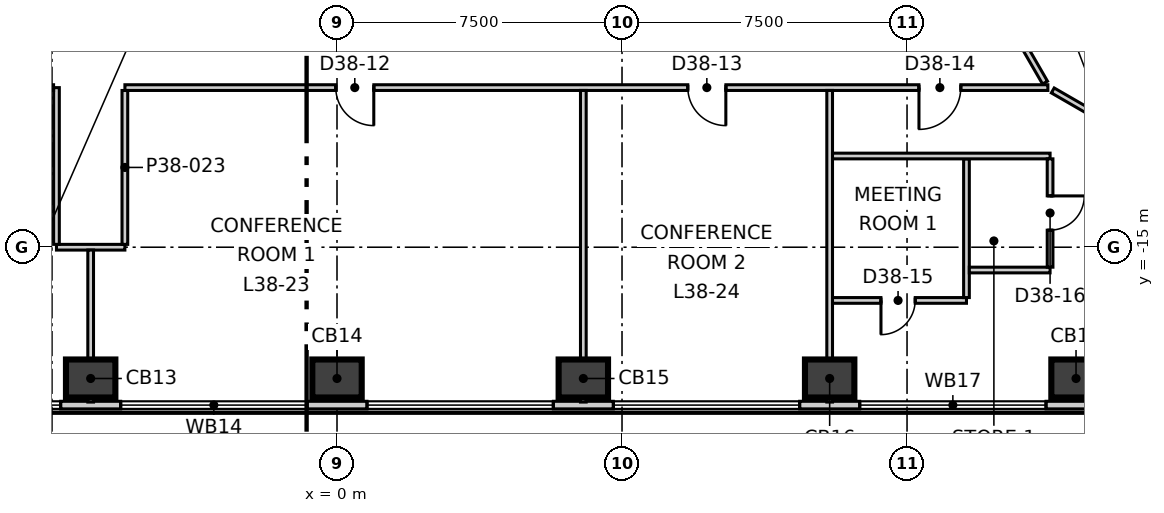
"""IFC4 building model, lengths in metres.
Left out: names, types, materials, properties, quantities, classifications, styles, units other than length and angle.
Written with IfcOpenShell. Run it as: python <this file> out.ifc"""

import sys

from ifc_helpers import new_model, si_unit, direction, frame, frame_2d, origin, origin_2d, place, context, subcontext, project, spatial, rectangle, extrude, element, fill, save


model = new_model("IFC4")
c1 = context("Model", 3, precision=1e-05, world=origin(), true_north=direction((0.0, 1.0)))
c2 = subcontext(c1, "Body", "Model", "MODEL_VIEW")
j1 = project(units=[si_unit("LENGTHUNIT", "METRE"), si_unit("PLANEANGLEUNIT", "RADIAN")], contexts=[c1])
p1 = place(None, origin())
s1 = spatial("IfcSite", under=j1, at=p1, CompositionType="ELEMENT")
p2 = place(p1, origin())
s2 = spatial("IfcBuilding", under=s1, at=p2, CompositionType="ELEMENT")
p3 = place(p2, frame((0.0, 0.0, 164.3)))
s3 = spatial("IfcBuildingStorey", under=s2, at=p3, CompositionType="ELEMENT", Elevation=164.3)
for number, where, z_axis, x_axis in (
    (1, (-6.482, -18.454, -0.3), (0.0, 0.0, 1.0), (1.0, 0.0, 0.0)),
    (2, (0.0, -18.454, -0.3), (0.0, 0.0, 1.0), (1.0, 0.0, 0.0)),
    (3, (6.482, -18.454, -0.3), (0.0, 0.0, 1.0), (1.0, 0.0, 0.0)),
    (4, (12.964, -18.454, -0.3), (0.0, 0.0, 1.0), (1.0, 0.0, 0.0)),
    (5, (19.447, -18.454, -0.3), (0.0, 0.0, 1.0), (1.0, 0.0, 0.0)),
):
    element("IfcColumn", number, at=place(p3, frame(where, z_axis=z_axis, x_axis=x_axis)), inside=s3, PredefinedType="COLUMN", context=c2, shape_type="SweptSolid", body=[
        extrude(rectangle(XDim=1.3, YDim=1.0, at=origin_2d()), origin(), (0.0, 0.0, 1.0), 4.0),
    ])
p4 = place(p3, frame((-2.972, 33.16, 0.0), z_axis=(0.0, 0.0, 1.0), x_axis=(-0.500009959561, -0.866019653553, 0.0)))
e6 = element("IfcWall", 6, at=p4, inside=s3, PredefinedType="ELEMENTEDWALL", context=c2, shape_type="SweptSolid", body=[
    extrude(rectangle(XDim=54.443, YDim=0.2, at=frame_2d((27.222, 0.0))), origin(), (0.0, 0.0, 1.0), 3.7),
])
p5 = place(p4, frame((2.094, 0.0, 0.9)))
e7 = element("IfcOpeningElement", 7, at=p5, cuts=e6, PredefinedType="OPENING", context=c2, shape_type="SweptSolid", body=[
    extrude(rectangle(XDim=4.9, YDim=2.5, at=frame_2d((2.45, 1.25))), frame((0.0, 0.11, 0.0), z_axis=(0.0, -1.0, 0.0), x_axis=(1.0, 0.0, 0.0)), (0.0, 0.0, 1.0), 0.22),
])
p6 = place(p4, frame((8.576, 0.0, 0.9)))
e8 = element("IfcOpeningElement", 8, at=p6, cuts=e6, PredefinedType="OPENING", context=c2, shape_type="SweptSolid", body=[
    extrude(rectangle(XDim=4.9, YDim=2.5, at=frame_2d((2.45, 1.25))), frame((0.0, 0.11, 0.0), z_axis=(0.0, -1.0, 0.0), x_axis=(1.0, 0.0, 0.0)), (0.0, 0.0, 1.0), 0.22),
])
p7 = place(p4, frame((15.058, 0.0, 0.9)))
e9 = element("IfcOpeningElement", 9, at=p7, cuts=e6, PredefinedType="OPENING", context=c2, shape_type="SweptSolid", body=[
    extrude(rectangle(XDim=4.9, YDim=2.5, at=frame_2d((2.45, 1.25))), frame((0.0, 0.11, 0.0), z_axis=(0.0, -1.0, 0.0), x_axis=(1.0, 0.0, 0.0)), (0.0, 0.0, 1.0), 0.22),
])
p8 = place(p4, frame((21.54, 0.0, 0.9)))
e10 = element("IfcOpeningElement", 10, at=p8, cuts=e6, PredefinedType="OPENING", context=c2, shape_type="SweptSolid", body=[
    extrude(rectangle(XDim=4.9, YDim=2.5, at=frame_2d((2.45, 1.25))), frame((0.0, 0.11, 0.0), z_axis=(0.0, -1.0, 0.0), x_axis=(1.0, 0.0, 0.0)), (0.0, 0.0, 1.0), 0.22),
])
p9 = place(p4, frame((28.022, 0.0, 0.9)))
e11 = element("IfcOpeningElement", 11, at=p9, cuts=e6, PredefinedType="OPENING", context=c2, shape_type="SweptSolid", body=[
    extrude(rectangle(XDim=4.9, YDim=2.5, at=frame_2d((2.45, 1.25))), frame((0.0, 0.11, 0.0), z_axis=(0.0, -1.0, 0.0), x_axis=(1.0, 0.0, 0.0)), (0.0, 0.0, 1.0), 0.22),
])
p10 = place(p4, frame((34.505, 0.0, 0.9)))
e12 = element("IfcOpeningElement", 12, at=p10, cuts=e6, PredefinedType="OPENING", context=c2, shape_type="SweptSolid", body=[
    extrude(rectangle(XDim=4.9, YDim=2.5, at=frame_2d((2.45, 1.25))), frame((0.0, 0.11, 0.0), z_axis=(0.0, -1.0, 0.0), x_axis=(1.0, 0.0, 0.0)), (0.0, 0.0, 1.0), 0.22),
])
p11 = place(p4, frame((40.987, 0.0, 0.9)))
e13 = element("IfcOpeningElement", 13, at=p11, cuts=e6, PredefinedType="OPENING", context=c2, shape_type="SweptSolid", body=[
    extrude(rectangle(XDim=4.9, YDim=2.5, at=frame_2d((2.45, 1.25))), frame((0.0, 0.11, 0.0), z_axis=(0.0, -1.0, 0.0), x_axis=(1.0, 0.0, 0.0)), (0.0, 0.0, 1.0), 0.22),
])
p12 = place(p4, frame((47.469, 0.0, 0.9)))
e14 = element("IfcOpeningElement", 14, at=p12, cuts=e6, PredefinedType="OPENING", context=c2, shape_type="SweptSolid", body=[
    extrude(rectangle(XDim=4.9, YDim=2.5, at=frame_2d((2.45, 1.25))), frame((0.0, 0.11, 0.0), z_axis=(0.0, -1.0, 0.0), x_axis=(1.0, 0.0, 0.0)), (0.0, 0.0, 1.0), 0.22),
])
p13 = place(p3, frame((-27.232, -19.154, 0.0), z_axis=(0.0, 0.0, 1.0), x_axis=(1.0, 0.0, 0.0)))
e15 = element("IfcWall", 15, at=p13, inside=s3, PredefinedType="ELEMENTEDWALL", context=c2, shape_type="SweptSolid", body=[
    extrude(rectangle(XDim=54.444, YDim=0.2, at=frame_2d((27.222, 0.0))), origin(), (0.0, 0.0, 1.0), 3.7),
])
p14 = place(p13, frame((2.094, 0.0, 0.9)))
e16 = element("IfcOpeningElement", 16, at=p14, cuts=e15, PredefinedType="OPENING", context=c2, shape_type="SweptSolid", body=[
    extrude(rectangle(XDim=4.9, YDim=2.5, at=frame_2d((2.45, 1.25))), frame((0.0, 0.11, 0.0), z_axis=(0.0, -1.0, 0.0), x_axis=(1.0, 0.0, 0.0)), (0.0, 0.0, 1.0), 0.22),
])
p15 = place(p13, frame((8.576, 0.0, 0.9)))
e17 = element("IfcOpeningElement", 17, at=p15, cuts=e15, PredefinedType="OPENING", context=c2, shape_type="SweptSolid", body=[
    extrude(rectangle(XDim=4.9, YDim=2.5, at=frame_2d((2.45, 1.25))), frame((0.0, 0.11, 0.0), z_axis=(0.0, -1.0, 0.0), x_axis=(1.0, 0.0, 0.0)), (0.0, 0.0, 1.0), 0.22),
])
p16 = place(p13, frame((15.059, 0.0, 0.9)))
e18 = element("IfcOpeningElement", 18, at=p16, cuts=e15, PredefinedType="OPENING", context=c2, shape_type="SweptSolid", body=[
    extrude(rectangle(XDim=4.9, YDim=2.5, at=frame_2d((2.45, 1.25))), frame((0.0, 0.11, 0.0), z_axis=(0.0, -1.0, 0.0), x_axis=(1.0, 0.0, 0.0)), (0.0, 0.0, 1.0), 0.22),
])
p17 = place(p13, frame((21.541, 0.0, 0.9)))
e19 = element("IfcOpeningElement", 19, at=p17, cuts=e15, PredefinedType="OPENING", context=c2, shape_type="SweptSolid", body=[
    extrude(rectangle(XDim=4.9, YDim=2.5, at=frame_2d((2.45, 1.25))), frame((0.0, 0.11, 0.0), z_axis=(0.0, -1.0, 0.0), x_axis=(1.0, 0.0, 0.0)), (0.0, 0.0, 1.0), 0.22),
])
p18 = place(p13, frame((28.023, 0.0, 0.9)))
e20 = element("IfcOpeningElement", 20, at=p18, cuts=e15, PredefinedType="OPENING", context=c2, shape_type="SweptSolid", body=[
    extrude(rectangle(XDim=4.9, YDim=2.5, at=frame_2d((2.45, 1.25))), frame((0.0, 0.11, 0.0), z_axis=(0.0, -1.0, 0.0), x_axis=(1.0, 0.0, 0.0)), (0.0, 0.0, 1.0), 0.22),
])
p19 = place(p13, frame((34.505, 0.0, 0.9)))
e21 = element("IfcOpeningElement", 21, at=p19, cuts=e15, PredefinedType="OPENING", context=c2, shape_type="SweptSolid", body=[
    extrude(rectangle(XDim=4.9, YDim=2.5, at=frame_2d((2.45, 1.25))), frame((0.0, 0.11, 0.0), z_axis=(0.0, -1.0, 0.0), x_axis=(1.0, 0.0, 0.0)), (0.0, 0.0, 1.0), 0.22),
])
p20 = place(p13, frame((40.988, 0.0, 0.9)))
e22 = element("IfcOpeningElement", 22, at=p20, cuts=e15, PredefinedType="OPENING", context=c2, shape_type="SweptSolid", body=[
    extrude(rectangle(XDim=4.9, YDim=2.5, at=frame_2d((2.45, 1.25))), frame((0.0, 0.11, 0.0), z_axis=(0.0, -1.0, 0.0), x_axis=(1.0, 0.0, 0.0)), (0.0, 0.0, 1.0), 0.22),
])
p21 = place(p13, frame((47.47, 0.0, 0.9)))
e23 = element("IfcOpeningElement", 23, at=p21, cuts=e15, PredefinedType="OPENING", context=c2, shape_type="SweptSolid", body=[
    extrude(rectangle(XDim=4.9, YDim=2.5, at=frame_2d((2.45, 1.25))), frame((0.0, 0.11, 0.0), z_axis=(0.0, -1.0, 0.0), x_axis=(1.0, 0.0, 0.0)), (0.0, 0.0, 1.0), 0.22),
])
p22 = place(p3, frame((30.204, -14.006, 0.0), z_axis=(0.0, 0.0, 1.0), x_axis=(-0.500008017777, 0.866020774669, 0.0)))
e24 = element("IfcWall", 24, at=p22, inside=s3, PredefinedType="ELEMENTEDWALL", context=c2, shape_type="SweptSolid", body=[
    extrude(rectangle(XDim=54.443, YDim=0.2, at=frame_2d((27.222, 0.0))), origin(), (0.0, 0.0, 1.0), 3.7),
])
p23 = place(p22, frame((2.094, 0.0, 0.9)))
e25 = element("IfcOpeningElement", 25, at=p23, cuts=e24, PredefinedType="OPENING", context=c2, shape_type="SweptSolid", body=[
    extrude(rectangle(XDim=4.9, YDim=2.5, at=frame_2d((2.45, 1.25))), frame((0.0, 0.11, 0.0), z_axis=(0.0, -1.0, 0.0), x_axis=(1.0, 0.0, 0.0)), (0.0, 0.0, 1.0), 0.22),
])
p24 = place(p22, frame((8.576, 0.0, 0.9)))
e26 = element("IfcOpeningElement", 26, at=p24, cuts=e24, PredefinedType="OPENING", context=c2, shape_type="SweptSolid", body=[
    extrude(rectangle(XDim=4.9, YDim=2.5, at=frame_2d((2.45, 1.25))), frame((0.0, 0.11, 0.0), z_axis=(0.0, -1.0, 0.0), x_axis=(1.0, 0.0, 0.0)), (0.0, 0.0, 1.0), 0.22),
])
p25 = place(p22, frame((15.058, 0.0, 0.9)))
e27 = element("IfcOpeningElement", 27, at=p25, cuts=e24, PredefinedType="OPENING", context=c2, shape_type="SweptSolid", body=[
    extrude(rectangle(XDim=4.9, YDim=2.5, at=frame_2d((2.45, 1.25))), frame((0.0, 0.11, 0.0), z_axis=(0.0, -1.0, 0.0), x_axis=(1.0, 0.0, 0.0)), (0.0, 0.0, 1.0), 0.22),
])
p26 = place(p22, frame((21.54, 0.0, 0.9)))
e28 = element("IfcOpeningElement", 28, at=p26, cuts=e24, PredefinedType="OPENING", context=c2, shape_type="SweptSolid", body=[
    extrude(rectangle(XDim=4.9, YDim=2.5, at=frame_2d((2.45, 1.25))), frame((0.0, 0.11, 0.0), z_axis=(0.0, -1.0, 0.0), x_axis=(1.0, 0.0, 0.0)), (0.0, 0.0, 1.0), 0.22),
])
p27 = place(p22, frame((28.023, 0.0, 0.9)))
e29 = element("IfcOpeningElement", 29, at=p27, cuts=e24, PredefinedType="OPENING", context=c2, shape_type="SweptSolid", body=[
    extrude(rectangle(XDim=4.9, YDim=2.5, at=frame_2d((2.45, 1.25))), frame((0.0, 0.11, 0.0), z_axis=(0.0, -1.0, 0.0), x_axis=(1.0, 0.0, 0.0)), (0.0, 0.0, 1.0), 0.22),
])
p28 = place(p22, frame((34.505, 0.0, 0.9)))
e30 = element("IfcOpeningElement", 30, at=p28, cuts=e24, PredefinedType="OPENING", context=c2, shape_type="SweptSolid", body=[
    extrude(rectangle(XDim=4.9, YDim=2.5, at=frame_2d((2.45, 1.25))), frame((0.0, 0.11, 0.0), z_axis=(0.0, -1.0, 0.0), x_axis=(1.0, 0.0, 0.0)), (0.0, 0.0, 1.0), 0.22),
])
p29 = place(p22, frame((40.987, 0.0, 0.9)))
e31 = element("IfcOpeningElement", 31, at=p29, cuts=e24, PredefinedType="OPENING", context=c2, shape_type="SweptSolid", body=[
    extrude(rectangle(XDim=4.9, YDim=2.5, at=frame_2d((2.45, 1.25))), frame((0.0, 0.11, 0.0), z_axis=(0.0, -1.0, 0.0), x_axis=(1.0, 0.0, 0.0)), (0.0, 0.0, 1.0), 0.22),
])
p30 = place(p22, frame((47.469, 0.0, 0.9)))
e32 = element("IfcOpeningElement", 32, at=p30, cuts=e24, PredefinedType="OPENING", context=c2, shape_type="SweptSolid", body=[
    extrude(rectangle(XDim=4.9, YDim=2.5, at=frame_2d((2.45, 1.25))), frame((0.0, 0.11, 0.0), z_axis=(0.0, -1.0, 0.0), x_axis=(1.0, 0.0, 0.0)), (0.0, 0.0, 1.0), 0.22),
])
p31 = place(p3, frame((-7.382, -15.0, 0.0), z_axis=(0.0, 0.0, 1.0), x_axis=(1.0, 0.0, 0.0)))
e33 = element("IfcWall", 33, at=p31, inside=s3, PredefinedType="PARTITIONING", context=c2, shape_type="SweptSolid", body=[
    extrude(rectangle(XDim=1.8, YDim=0.15, at=frame_2d((0.9, 0.0))), origin(), (0.0, 0.0, 1.0), 3.7),
])
p32 = place(p3, frame((-7.382, -14.925, 0.0), z_axis=(0.0, 0.0, 1.0), x_axis=(0.0, 1.0, 0.0)))
e34 = element("IfcWall", 34, at=p32, inside=s3, PredefinedType="PARTITIONING", context=c2, shape_type="SweptSolid", body=[
    extrude(rectangle(XDim=4.124, YDim=0.15, at=frame_2d((2.062, 0.0))), origin(), (0.0, 0.0, 1.0), 3.7),
])
p33 = place(p3, frame((-18.556, -10.8, 0.0), z_axis=(0.0, 0.0, 1.0), x_axis=(1.0, 0.0, 0.0)))
e35 = element("IfcWall", 35, at=p33, inside=s3, PredefinedType="PARTITIONING", context=c2, shape_type="SweptSolid", body=[
    extrude(rectangle(XDim=11.098, YDim=0.15, at=frame_2d((5.549, 0.0))), origin(), (0.0, 0.0, 1.0), 3.7),
])
p34 = place(p33, frame((5.0, 0.0, 0.0)))
e36 = element("IfcOpeningElement", 36, at=p34, cuts=e35, PredefinedType="OPENING", context=c2, shape_type="SweptSolid", body=[
    extrude(rectangle(XDim=1.1, YDim=2.1, at=frame_2d((0.55, 1.05))), frame((0.0, 0.085, 0.0), z_axis=(0.0, -1.0, 0.0), x_axis=(1.0, 0.0, 0.0)), (0.0, 0.0, 1.0), 0.17),
])
p35 = place(p3, frame((-5.581, -10.8, 0.0), z_axis=(0.0, 0.0, 1.0), x_axis=(1.0, 0.0, 0.0)))
e37 = element("IfcWall", 37, at=p35, inside=s3, PredefinedType="PARTITIONING", context=c2, shape_type="SweptSolid", body=[
    extrude(rectangle(XDim=24.287, YDim=0.15, at=frame_2d((12.144, 0.0))), origin(), (0.0, 0.0, 1.0), 3.7),
])
p36 = place(p35, frame((5.549, 0.0, 0.0)))
e38 = element("IfcOpeningElement", 38, at=p36, cuts=e37, PredefinedType="OPENING", context=c2, shape_type="SweptSolid", body=[
    extrude(rectangle(XDim=1.0, YDim=2.1, at=frame_2d((0.5, 1.05))), frame((0.0, 0.085, 0.0), z_axis=(0.0, -1.0, 0.0), x_axis=(1.0, 0.0, 0.0)), (0.0, 0.0, 1.0), 0.17),
])
p37 = place(p35, frame((14.813, 0.0, 0.0)))
e39 = element("IfcOpeningElement", 39, at=p37, cuts=e37, PredefinedType="OPENING", context=c2, shape_type="SweptSolid", body=[
    extrude(rectangle(XDim=1.0, YDim=2.1, at=frame_2d((0.5, 1.05))), frame((0.0, 0.085, 0.0), z_axis=(0.0, -1.0, 0.0), x_axis=(1.0, 0.0, 0.0)), (0.0, 0.0, 1.0), 0.17),
])
p38 = place(p35, frame((20.895, 0.0, 0.0)))
e40 = element("IfcOpeningElement", 40, at=p38, cuts=e37, PredefinedType="OPENING", context=c2, shape_type="SweptSolid", body=[
    extrude(rectangle(XDim=1.1, YDim=2.1, at=frame_2d((0.55, 1.05))), frame((0.0, 0.085, 0.0), z_axis=(0.0, -1.0, 0.0), x_axis=(1.0, 0.0, 0.0)), (0.0, 0.0, 1.0), 0.17),
])
p39 = place(p3, frame((18.835, -10.875, 0.0), z_axis=(0.0, 0.0, 1.0), x_axis=(0.866012362072, -0.500022588228, 0.0)))
e41 = element("IfcWall", 41, at=p39, inside=s3, PredefinedType="PARTITIONING", context=c2, shape_type="SweptSolid", body=[
    extrude(rectangle(XDim=5.328, YDim=0.15, at=frame_2d((2.664, 0.0))), origin(), (0.0, 0.0, 1.0), 3.2),
])
p40 = place(p3, frame((-6.482, -19.074, 0.0), z_axis=(0.0, 0.0, 1.0), x_axis=(0.0, 1.0, 0.0)))
e42 = element("IfcWall", 42, at=p40, inside=s3, PredefinedType="PARTITIONING", context=c2, shape_type="SweptSolid", body=[
    extrude(rectangle(XDim=3.999, YDim=0.15, at=frame_2d((2.0, 0.0))), origin(), (0.0, 0.0, 1.0), 3.7),
])
p41 = place(p3, frame((-5.582, -14.925, 0.0), z_axis=(0.0, 0.0, 1.0), x_axis=(0.0, 1.0, 0.0)))
e43 = element("IfcWall", 43, at=p41, inside=s3, PredefinedType="PARTITIONING", context=c2, shape_type="SweptSolid", body=[
    extrude(rectangle(XDim=4.049, YDim=0.15, at=frame_2d((2.024, 0.0))), origin(), (0.0, 0.0, 1.0), 3.7),
])
p42 = place(p3, frame((9.804, 4.62, 0.0), z_axis=(0.0, 0.0, 1.0), x_axis=(0.500000173646, -0.86602530353, 0.0)))
e44 = element("IfcWall", 44, at=p42, inside=s3, PredefinedType="PARTITIONING", context=c2, shape_type="SweptSolid", body=[
    extrude(rectangle(XDim=17.654, YDim=0.15, at=frame_2d((8.827, 0.0))), origin(), (0.0, 0.0, 1.0), 3.7),
])
p43 = place(p42, frame((14.354, 0.0, 0.0)))
e45 = element("IfcOpeningElement", 45, at=p43, cuts=e44, PredefinedType="OPENING", context=c2, shape_type="SweptSolid", body=[
    extrude(rectangle(XDim=1.1, YDim=2.1, at=frame_2d((0.55, 1.05))), frame((0.0, 0.085, 0.0), z_axis=(0.0, -1.0, 0.0), x_axis=(1.0, 0.0, 0.0)), (0.0, 0.0, 1.0), 0.17),
])
p44 = place(p42, frame((10.014, 0.0, 0.0)))
e46 = element("IfcOpeningElement", 46, at=p44, cuts=e44, PredefinedType="OPENING", context=c2, shape_type="SweptSolid", body=[
    extrude(rectangle(XDim=0.9, YDim=2.1, at=frame_2d((0.45, 1.05))), frame((0.0, 0.085, 0.0), z_axis=(0.0, -1.0, 0.0), x_axis=(1.0, 0.0, 0.0)), (0.0, 0.0, 1.0), 0.17),
])
p45 = place(p42, frame((6.814, 0.0, 0.0)))
e47 = element("IfcOpeningElement", 47, at=p45, cuts=e44, PredefinedType="OPENING", context=c2, shape_type="SweptSolid", body=[
    extrude(rectangle(XDim=0.9, YDim=2.1, at=frame_2d((0.45, 1.05))), frame((0.0, 0.085, 0.0), z_axis=(0.0, -1.0, 0.0), x_axis=(1.0, 0.0, 0.0)), (0.0, 0.0, 1.0), 0.17),
])
p46 = place(p42, frame((4.014, 0.0, 0.0)))
e48 = element("IfcOpeningElement", 48, at=p46, cuts=e44, PredefinedType="OPENING", context=c2, shape_type="SweptSolid", body=[
    extrude(rectangle(XDim=1.0, YDim=2.1, at=frame_2d((0.5, 1.05))), frame((0.0, 0.085, 0.0), z_axis=(0.0, -1.0, 0.0), x_axis=(1.0, 0.0, 0.0)), (0.0, 0.0, 1.0), 0.17),
])
for number, where, z_axis, x_axis in (
    (49, (6.482, -19.074, 0.0), (0.0, 0.0, 1.0), (0.0, 1.0, 0.0)),
    (50, (12.964, -19.074, 0.0), (0.0, 0.0, 1.0), (0.0, 1.0, 0.0)),
):
    element("IfcWall", number, at=place(p3, frame(where, z_axis=z_axis, x_axis=x_axis)), inside=s3, PredefinedType="PARTITIONING", context=c2, shape_type="SweptSolid", body=[
        extrude(rectangle(XDim=8.199, YDim=0.15, at=frame_2d((4.1, 0.0))), origin(), (0.0, 0.0, 1.0), 3.7),
    ])
p47 = place(p3, frame((13.039, -16.4, 0.0), z_axis=(0.0, 0.0, 1.0), x_axis=(1.0, 0.0, 0.0)))
e51 = element("IfcWall", 51, at=p47, inside=s3, PredefinedType="PARTITIONING", context=c2, shape_type="SweptSolid", body=[
    extrude(rectangle(XDim=3.525, YDim=0.15, at=frame_2d((1.762, 0.0))), origin(), (0.0, 0.0, 1.0), 3.7),
])
p48 = place(p47, frame((1.275, 0.0, 0.0)))
e52 = element("IfcOpeningElement", 52, at=p48, cuts=e51, PredefinedType="OPENING", context=c2, shape_type="SweptSolid", body=[
    extrude(rectangle(XDim=0.9, YDim=2.1, at=frame_2d((0.45, 1.05))), frame((0.0, 0.085, 0.0), z_axis=(0.0, -1.0, 0.0), x_axis=(1.0, 0.0, 0.0)), (0.0, 0.0, 1.0), 0.17),
])
p49 = place(p3, frame((16.564, -16.325, 0.0), z_axis=(0.0, 0.0, 1.0), x_axis=(0.0, 1.0, 0.0)))
e53 = element("IfcWall", 53, at=p49, inside=s3, PredefinedType="PARTITIONING", context=c2, shape_type="SweptSolid", body=[
    extrude(rectangle(XDim=3.65, YDim=0.15, at=frame_2d((1.825, 0.0))), origin(), (0.0, 0.0, 1.0), 3.7),
])
p50 = place(p3, frame((13.039, -12.6, 0.0), z_axis=(0.0, 0.0, 1.0), x_axis=(1.0, 0.0, 0.0)))
e54 = element("IfcWall", 54, at=p50, inside=s3, PredefinedType="PARTITIONING", context=c2, shape_type="SweptSolid", body=[
    extrude(rectangle(XDim=5.725, YDim=0.15, at=frame_2d((2.862, 0.0))), origin(), (0.0, 0.0, 1.0), 3.7),
])
p51 = place(p3, frame((16.639, -15.6, 0.0), z_axis=(0.0, 0.0, 1.0), x_axis=(1.0, 0.0, 0.0)))
e55 = element("IfcWall", 55, at=p51, inside=s3, PredefinedType="PARTITIONING", context=c2, shape_type="SweptSolid", body=[
    extrude(rectangle(XDim=2.125, YDim=0.15, at=frame_2d((1.062, 0.0))), origin(), (0.0, 0.0, 1.0), 3.7),
])
p52 = place(p3, frame((18.764, -15.525, 0.0), z_axis=(0.0, 0.0, 1.0), x_axis=(0.0, 1.0, 0.0)))
e56 = element("IfcWall", 56, at=p52, inside=s3, PredefinedType="PARTITIONING", context=c2, shape_type="SweptSolid", body=[
    extrude(rectangle(XDim=2.85, YDim=0.15, at=frame_2d((1.425, 0.0))), origin(), (0.0, 0.0, 1.0), 3.7),
])
p53 = place(p52, frame((0.975, 0.0, 0.0)))
e57 = element("IfcOpeningElement", 57, at=p53, cuts=e56, PredefinedType="OPENING", context=c2, shape_type="SweptSolid", body=[
    extrude(rectangle(XDim=0.9, YDim=2.1, at=frame_2d((0.45, 1.05))), frame((0.0, 0.085, 0.0), z_axis=(0.0, -1.0, 0.0), x_axis=(1.0, 0.0, 0.0)), (0.0, 0.0, 1.0), 0.17),
])
p54 = place(p16, origin())
e58 = element("IfcWindow", 58, at=p54, inside=s3, PartitioningType="SINGLE_PANEL", PredefinedType="WINDOW", context=c2, shape_type="SweptSolid", body=[
    extrude(rectangle(XDim=4.9, YDim=2.5, at=frame_2d((2.45, 1.25))), frame((0.0, 0.03, 0.0), z_axis=(0.0, -1.0, 0.0), x_axis=(1.0, 0.0, 0.0)), (0.0, 0.0, 1.0), 0.06),
])
fill(e18, e58)
p55 = place(p17, origin())
e59 = element("IfcWindow", 59, at=p55, inside=s3, PartitioningType="SINGLE_PANEL", PredefinedType="WINDOW", context=c2, shape_type="SweptSolid", body=[
    extrude(rectangle(XDim=4.9, YDim=2.5, at=frame_2d((2.45, 1.25))), frame((0.0, 0.03, 0.0), z_axis=(0.0, -1.0, 0.0), x_axis=(1.0, 0.0, 0.0)), (0.0, 0.0, 1.0), 0.06),
])
fill(e19, e59)
p56 = place(p18, origin())
e60 = element("IfcWindow", 60, at=p56, inside=s3, PartitioningType="SINGLE_PANEL", PredefinedType="WINDOW", context=c2, shape_type="SweptSolid", body=[
    extrude(rectangle(XDim=4.9, YDim=2.5, at=frame_2d((2.45, 1.25))), frame((0.0, 0.03, 0.0), z_axis=(0.0, -1.0, 0.0), x_axis=(1.0, 0.0, 0.0)), (0.0, 0.0, 1.0), 0.06),
])
fill(e20, e60)
p57 = place(p19, origin())
e61 = element("IfcWindow", 61, at=p57, inside=s3, PartitioningType="SINGLE_PANEL", PredefinedType="WINDOW", context=c2, shape_type="SweptSolid", body=[
    extrude(rectangle(XDim=4.9, YDim=2.5, at=frame_2d((2.45, 1.25))), frame((0.0, 0.03, 0.0), z_axis=(0.0, -1.0, 0.0), x_axis=(1.0, 0.0, 0.0)), (0.0, 0.0, 1.0), 0.06),
])
fill(e21, e61)
p58 = place(p20, origin())
e62 = element("IfcWindow", 62, at=p58, inside=s3, PartitioningType="SINGLE_PANEL", PredefinedType="WINDOW", context=c2, shape_type="SweptSolid", body=[
    extrude(rectangle(XDim=4.9, YDim=2.5, at=frame_2d((2.45, 1.25))), frame((0.0, 0.03, 0.0), z_axis=(0.0, -1.0, 0.0), x_axis=(1.0, 0.0, 0.0)), (0.0, 0.0, 1.0), 0.06),
])
fill(e22, e62)
p59 = place(p36, origin())
e63 = element("IfcDoor", 63, at=p59, inside=s3, OperationType="SINGLE_SWING_RIGHT", PredefinedType="DOOR", context=c2, shape_type="SweptSolid", body=[
    extrude(rectangle(XDim=1.0, YDim=2.1, at=frame_2d((0.5, 1.05))), frame((0.0, 0.025, 0.0), z_axis=(0.0, -1.0, 0.0), x_axis=(1.0, 0.0, 0.0)), (0.0, 0.0, 1.0), 0.05),
])
fill(e38, e63)
p60 = place(p37, origin())
e64 = element("IfcDoor", 64, at=p60, inside=s3, OperationType="SINGLE_SWING_RIGHT", PredefinedType="DOOR", context=c2, shape_type="SweptSolid", body=[
    extrude(rectangle(XDim=1.0, YDim=2.1, at=frame_2d((0.5, 1.05))), frame((0.0, 0.025, 0.0), z_axis=(0.0, -1.0, 0.0), x_axis=(1.0, 0.0, 0.0)), (0.0, 0.0, 1.0), 0.05),
])
fill(e39, e64)
p61 = place(p38, origin())
e65 = element("IfcDoor", 65, at=p61, inside=s3, OperationType="SINGLE_SWING_LEFT", PredefinedType="DOOR", context=c2, shape_type="SweptSolid", body=[
    extrude(rectangle(XDim=1.1, YDim=2.1, at=frame_2d((0.55, 1.05))), frame((0.0, 0.025, 0.0), z_axis=(0.0, -1.0, 0.0), x_axis=(1.0, 0.0, 0.0)), (0.0, 0.0, 1.0), 0.05),
])
fill(e40, e65)
p62 = place(p48, origin())
e66 = element("IfcDoor", 66, at=p62, inside=s3, OperationType="SINGLE_SWING_LEFT", PredefinedType="DOOR", context=c2, shape_type="SweptSolid", body=[
    extrude(rectangle(XDim=0.9, YDim=2.1, at=frame_2d((0.45, 1.05))), frame((0.0, 0.025, 0.0), z_axis=(0.0, -1.0, 0.0), x_axis=(1.0, 0.0, 0.0)), (0.0, 0.0, 1.0), 0.05),
])
fill(e52, e66)
p63 = place(p53, origin())
e67 = element("IfcDoor", 67, at=p63, inside=s3, OperationType="SINGLE_SWING_RIGHT", PredefinedType="DOOR", context=c2, shape_type="SweptSolid", body=[
    extrude(rectangle(XDim=0.9, YDim=2.1, at=frame_2d((0.45, 1.05))), frame((0.0, 0.025, 0.0), z_axis=(0.0, -1.0, 0.0), x_axis=(1.0, 0.0, 0.0)), (0.0, 0.0, 1.0), 0.05),
])
fill(e57, e67)
save(model, sys.argv[1])
